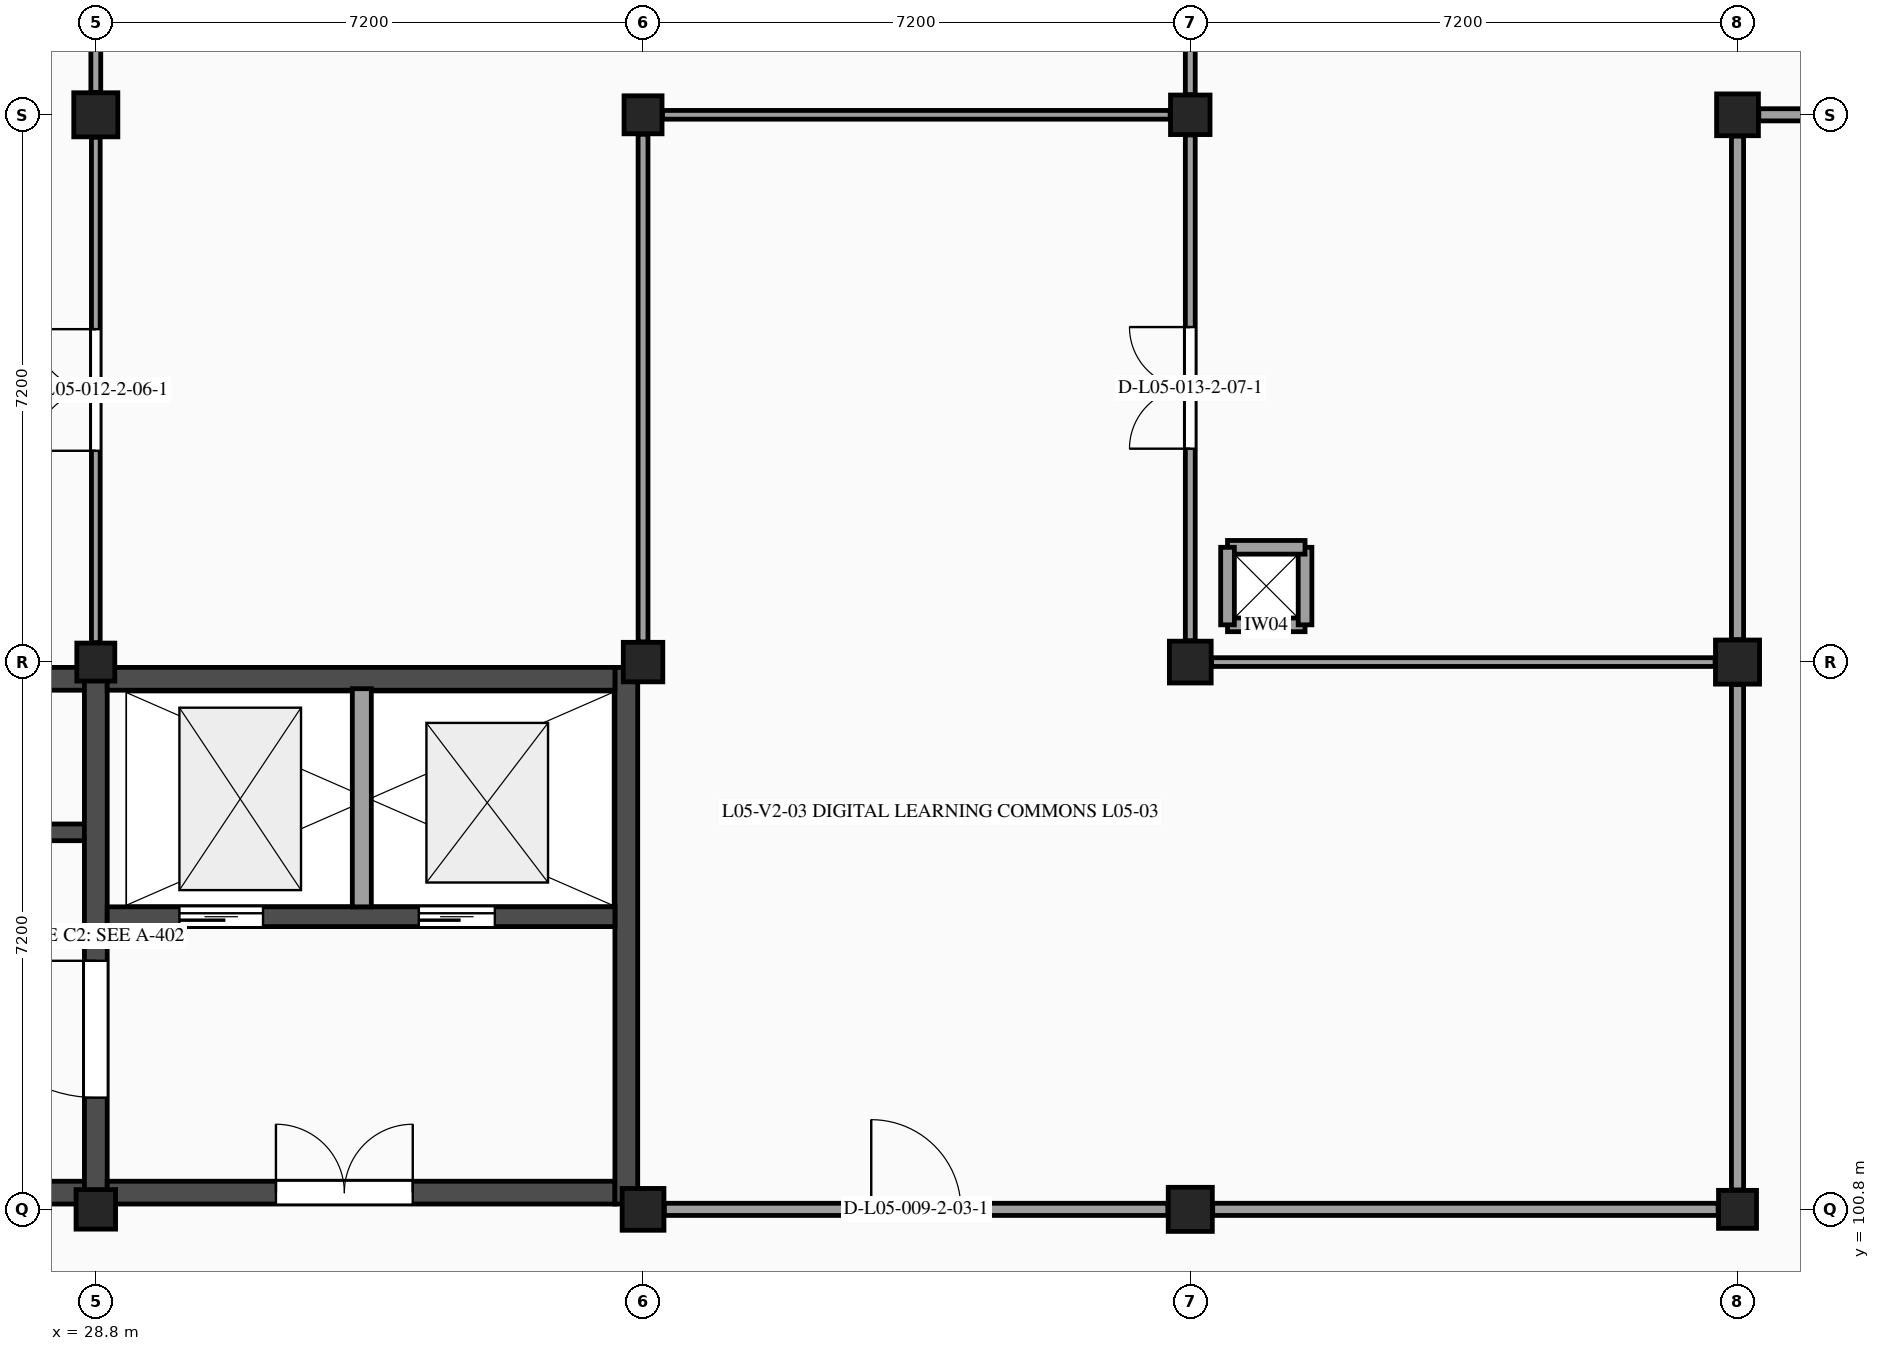
"""IFC4 building model, lengths in metres.
Left out: names, types, materials, properties, quantities, classifications, styles, units other than length and angle.
Written with IfcOpenShell. Run it as: python <this file> out.ifc"""

import sys

from ifc_helpers import new_model, si_unit, direction, frame, frame_2d, origin, origin_2d, place, context, subcontext, project, spatial, rectangle, extrude, element, fill, save


model = new_model("IFC4")
c1 = context("Model", 3, precision=1e-05, world=origin(), true_north=direction((0.0, 1.0)))
c2 = subcontext(c1, "Body", "Model", "MODEL_VIEW")
j1 = project(units=[si_unit("LENGTHUNIT", "METRE"), si_unit("PLANEANGLEUNIT", "RADIAN")], contexts=[c1])
p1 = place(None, origin())
s1 = spatial("IfcSite", under=j1, at=p1, CompositionType="ELEMENT")
p2 = place(p1, origin())
s2 = spatial("IfcBuilding", under=s1, at=p2, CompositionType="ELEMENT")
p3 = place(p2, frame((0.0, 0.0, 22.8)))
s3 = spatial("IfcBuildingStorey", under=s2, at=p3, CompositionType="ELEMENT", Elevation=22.8)
p4 = place(p3, frame((28.8, 100.8, 0.0), z_axis=(0.0, 0.0, 1.0), x_axis=(1.0, 0.0, 0.0)))
e1 = element("IfcColumn", 1, at=p4, inside=s3, PredefinedType="COLUMN", context=c2, shape_type="SweptSolid", body=[
    extrude(rectangle(XDim=0.52, YDim=0.52, at=origin_2d()), origin(), (0.0, 0.0, 1.0), 3.9),
])
p5 = place(p3, frame((28.8, 108.0, 0.0), z_axis=(0.0, 0.0, 1.0), x_axis=(1.0, 0.0, 0.0)))
e2 = element("IfcColumn", 2, at=p5, inside=s3, PredefinedType="COLUMN", context=c2, shape_type="SweptSolid", body=[
    extrude(rectangle(XDim=0.5, YDim=0.5, at=origin_2d()), origin(), (0.0, 0.0, 1.0), 3.9),
])
p6 = place(p3, frame((28.8, 115.2, 0.0), z_axis=(0.0, 0.0, 1.0), x_axis=(1.0, 0.0, 0.0)))
e3 = element("IfcColumn", 3, at=p6, inside=s3, PredefinedType="COLUMN", context=c2, shape_type="SweptSolid", body=[
    extrude(rectangle(XDim=0.58, YDim=0.58, at=origin_2d()), origin(), (0.0, 0.0, 1.0), 3.9),
])
p7 = place(p3, frame((36.0, 100.8, 0.0), z_axis=(0.0, 0.0, 1.0), x_axis=(1.0, 0.0, 0.0)))
e4 = element("IfcColumn", 4, at=p7, inside=s3, PredefinedType="COLUMN", context=c2, shape_type="SweptSolid", body=[
    extrude(rectangle(XDim=0.55, YDim=0.55, at=origin_2d()), origin(), (0.0, 0.0, 1.0), 3.9),
])
p8 = place(p3, frame((36.0, 108.0, 0.0), z_axis=(0.0, 0.0, 1.0), x_axis=(1.0, 0.0, 0.0)))
e5 = element("IfcColumn", 5, at=p8, inside=s3, PredefinedType="COLUMN", context=c2, shape_type="SweptSolid", body=[
    extrude(rectangle(XDim=0.52, YDim=0.52, at=origin_2d()), origin(), (0.0, 0.0, 1.0), 3.9),
])
p9 = place(p3, frame((36.0, 115.2, 0.0), z_axis=(0.0, 0.0, 1.0), x_axis=(1.0, 0.0, 0.0)))
e6 = element("IfcColumn", 6, at=p9, inside=s3, PredefinedType="COLUMN", context=c2, shape_type="SweptSolid", body=[
    extrude(rectangle(XDim=0.5, YDim=0.5, at=origin_2d()), origin(), (0.0, 0.0, 1.0), 3.9),
])
p10 = place(p3, frame((43.2, 100.8, 0.0), z_axis=(0.0, 0.0, 1.0), x_axis=(1.0, 0.0, 0.0)))
e7 = element("IfcColumn", 7, at=p10, inside=s3, PredefinedType="COLUMN", context=c2, shape_type="SweptSolid", body=[
    extrude(rectangle(XDim=0.58, YDim=0.58, at=origin_2d()), origin(), (0.0, 0.0, 1.0), 3.9),
])
p11 = place(p3, frame((43.2, 108.0, 0.0), z_axis=(0.0, 0.0, 1.0), x_axis=(1.0, 0.0, 0.0)))
e8 = element("IfcColumn", 8, at=p11, inside=s3, PredefinedType="COLUMN", context=c2, shape_type="SweptSolid", body=[
    extrude(rectangle(XDim=0.55, YDim=0.55, at=origin_2d()), origin(), (0.0, 0.0, 1.0), 3.9),
])
p12 = place(p3, frame((43.2, 115.2, 0.0), z_axis=(0.0, 0.0, 1.0), x_axis=(1.0, 0.0, 0.0)))
e9 = element("IfcColumn", 9, at=p12, inside=s3, PredefinedType="COLUMN", context=c2, shape_type="SweptSolid", body=[
    extrude(rectangle(XDim=0.52, YDim=0.52, at=origin_2d()), origin(), (0.0, 0.0, 1.0), 3.9),
])
p13 = place(p3, frame((50.4, 100.8, 0.0), z_axis=(0.0, 0.0, 1.0), x_axis=(1.0, 0.0, 0.0)))
e10 = element("IfcColumn", 10, at=p13, inside=s3, PredefinedType="COLUMN", context=c2, shape_type="SweptSolid", body=[
    extrude(rectangle(XDim=0.5, YDim=0.5, at=origin_2d()), origin(), (0.0, 0.0, 1.0), 3.9),
])
p14 = place(p3, frame((50.4, 108.0, 0.0), z_axis=(0.0, 0.0, 1.0), x_axis=(1.0, 0.0, 0.0)))
e11 = element("IfcColumn", 11, at=p14, inside=s3, PredefinedType="COLUMN", context=c2, shape_type="SweptSolid", body=[
    extrude(rectangle(XDim=0.58, YDim=0.58, at=origin_2d()), origin(), (0.0, 0.0, 1.0), 3.9),
])
p15 = place(p3, frame((50.4, 115.2, 0.0), z_axis=(0.0, 0.0, 1.0), x_axis=(1.0, 0.0, 0.0)))
e12 = element("IfcColumn", 12, at=p15, inside=s3, PredefinedType="COLUMN", context=c2, shape_type="SweptSolid", body=[
    extrude(rectangle(XDim=0.55, YDim=0.55, at=origin_2d()), origin(), (0.0, 0.0, 1.0), 3.9),
])
p16 = place(p3, frame((21.97, 101.02, 0.0), z_axis=(0.0, 0.0, 1.0), x_axis=(1.0, 0.0, 0.0)))
e13 = element("IfcWall", 13, at=p16, inside=s3, PredefinedType="SHEAR", context=c2, shape_type="SweptSolid", body=[
    extrude(rectangle(XDim=6.68, YDim=0.3, at=frame_2d((3.34, 0.0))), origin(), (0.0, 0.0, 1.0), 3.67),
])
p17 = place(p3, frame((21.97, 107.78, 0.0), z_axis=(0.0, 0.0, 1.0), x_axis=(1.0, 0.0, 0.0)))
e14 = element("IfcWall", 14, at=p17, inside=s3, PredefinedType="SHEAR", context=c2, shape_type="SweptSolid", body=[
    extrude(rectangle(XDim=6.68, YDim=0.3, at=frame_2d((3.34, 0.0))), origin(), (0.0, 0.0, 1.0), 3.67),
])
p18 = place(p17, frame((1.42, 0.0, 0.0)))
e15 = element("IfcOpeningElement", 15, at=p18, cuts=e14, PredefinedType="OPENING", context=c2, shape_type="SweptSolid", body=[
    extrude(rectangle(XDim=0.85, YDim=2.1, at=frame_2d((0.425, 1.05))), frame((0.0, 0.16, 0.0), z_axis=(0.0, -1.0, 0.0), x_axis=(1.0, 0.0, 0.0)), (0.0, 0.0, 1.0), 0.32),
])
p19 = place(p17, frame((3.4, 0.0, 0.0)))
e16 = element("IfcOpeningElement", 16, at=p19, cuts=e14, PredefinedType="OPENING", context=c2, shape_type="SweptSolid", body=[
    extrude(rectangle(XDim=0.95, YDim=2.15, at=frame_2d((0.475, 1.075))), frame((0.0, 0.16, 0.0), z_axis=(0.0, -1.0, 0.0), x_axis=(1.0, 0.0, 0.0)), (0.0, 0.0, 1.0), 0.32),
])
p20 = place(p3, frame((21.97, 105.76, 0.0), z_axis=(0.0, 0.0, 1.0), x_axis=(1.0, 0.0, 0.0)))
e17 = element("IfcWall", 17, at=p20, inside=s3, PredefinedType="SHEAR", context=c2, shape_type="SweptSolid", body=[
    extrude(rectangle(XDim=6.68, YDim=0.22, at=frame_2d((3.34, 0.0))), origin(), (0.0, 0.0, 1.0), 3.67),
])
p21 = place(p3, frame((28.8, 100.87, 0.0), z_axis=(0.0, 0.0, 1.0), x_axis=(0.0, 1.0, 0.0)))
e18 = element("IfcWall", 18, at=p21, inside=s3, PredefinedType="SHEAR", context=c2, shape_type="SweptSolid", body=[
    extrude(rectangle(XDim=7.06, YDim=0.3, at=frame_2d((3.53, 0.0))), origin(), (0.0, 0.0, 1.0), 3.67),
])
p22 = place(p21, frame((1.4, 0.0, 0.0)))
e19 = element("IfcOpeningElement", 19, at=p22, cuts=e18, PredefinedType="OPENING", context=c2, shape_type="SweptSolid", body=[
    extrude(rectangle(XDim=1.8, YDim=2.2, at=frame_2d((0.9, 1.1))), frame((0.0, 0.16, 0.0), z_axis=(0.0, -1.0, 0.0), x_axis=(1.0, 0.0, 0.0)), (0.0, 0.0, 1.0), 0.32),
])
p23 = place(p3, frame((28.95, 101.02, 0.0), z_axis=(0.0, 0.0, 1.0), x_axis=(1.0, 0.0, 0.0)))
e20 = element("IfcWall", 20, at=p23, inside=s3, PredefinedType="SHEAR", context=c2, shape_type="SweptSolid", body=[
    extrude(rectangle(XDim=6.68, YDim=0.3, at=frame_2d((3.34, 0.0))), origin(), (0.0, 0.0, 1.0), 3.67),
])
p24 = place(p23, frame((2.22, 0.0, 0.0)))
e21 = element("IfcOpeningElement", 21, at=p24, cuts=e20, PredefinedType="OPENING", context=c2, shape_type="SweptSolid", body=[
    extrude(rectangle(XDim=1.8, YDim=2.2, at=frame_2d((0.9, 1.1))), frame((0.0, 0.16, 0.0), z_axis=(0.0, -1.0, 0.0), x_axis=(1.0, 0.0, 0.0)), (0.0, 0.0, 1.0), 0.32),
])
p25 = place(p3, frame((35.78, 100.87, 0.0), z_axis=(0.0, 0.0, 1.0), x_axis=(0.0, 1.0, 0.0)))
e22 = element("IfcWall", 22, at=p25, inside=s3, PredefinedType="SHEAR", context=c2, shape_type="SweptSolid", body=[
    extrude(rectangle(XDim=7.06, YDim=0.3, at=frame_2d((3.53, 0.0))), origin(), (0.0, 0.0, 1.0), 3.67),
])
p26 = place(p3, frame((28.95, 107.78, 0.0), z_axis=(0.0, 0.0, 1.0), x_axis=(1.0, 0.0, 0.0)))
e23 = element("IfcWall", 23, at=p26, inside=s3, PredefinedType="SHEAR", context=c2, shape_type="SweptSolid", body=[
    extrude(rectangle(XDim=6.68, YDim=0.3, at=frame_2d((3.34, 0.0))), origin(), (0.0, 0.0, 1.0), 3.67),
])
p27 = place(p3, frame((28.95, 104.65, 0.0), z_axis=(0.0, 0.0, 1.0), x_axis=(1.0, 0.0, 0.0)))
e24 = element("IfcWall", 24, at=p27, inside=s3, PredefinedType="SHEAR", context=c2, shape_type="SweptSolid", body=[
    extrude(rectangle(XDim=6.68, YDim=0.26, at=frame_2d((3.34, 0.0))), origin(), (0.0, 0.0, 1.0), 3.67),
])
p28 = place(p27, frame((0.95, 0.0, 0.0)))
e25 = element("IfcOpeningElement", 25, at=p28, cuts=e24, PredefinedType="OPENING", context=c2, shape_type="SweptSolid", body=[
    extrude(rectangle(XDim=1.1, YDim=2.2, at=frame_2d((0.55, 1.1))), frame((0.0, 0.14, 0.0), z_axis=(0.0, -1.0, 0.0), x_axis=(1.0, 0.0, 0.0)), (0.0, 0.0, 1.0), 0.28),
])
p29 = place(p27, frame((4.1, 0.0, 0.0)))
e26 = element("IfcOpeningElement", 26, at=p29, cuts=e24, PredefinedType="OPENING", context=c2, shape_type="SweptSolid", body=[
    extrude(rectangle(XDim=1.0, YDim=2.15, at=frame_2d((0.5, 1.075))), frame((0.0, 0.14, 0.0), z_axis=(0.0, -1.0, 0.0), x_axis=(1.0, 0.0, 0.0)), (0.0, 0.0, 1.0), 0.28),
])
p30 = place(p3, frame((32.3, 104.78, 0.0), z_axis=(0.0, 0.0, 1.0), x_axis=(0.0, 1.0, 0.0)))
e27 = element("IfcWall", 27, at=p30, inside=s3, PredefinedType="PARTITIONING", context=c2, shape_type="SweptSolid", body=[
    extrude(rectangle(XDim=2.87, YDim=0.25, at=frame_2d((1.435, 0.0))), origin(), (0.0, 0.0, 1.0), 3.67),
])
for number, where, z_axis, x_axis in (
    (28, (43.69, 108.49, 0.0), (0.0, 0.0, 1.0), (1.0, 0.0, 0.0)),
    (29, (44.71, 108.49, 0.0), (0.0, 0.0, 1.0), (0.0, 1.0, 0.0)),
    (30, (44.71, 109.51, 0.0), (0.0, 0.0, 1.0), (-1.0, 0.0, 0.0)),
    (31, (43.69, 109.51, 0.0), (0.0, 0.0, 1.0), (0.0, -1.0, 0.0)),
):
    element("IfcWall", number, at=place(p3, frame(where, z_axis=z_axis, x_axis=x_axis)), inside=s3, PredefinedType="PARTITIONING", context=c2, shape_type="SweptSolid", body=[
        extrude(rectangle(XDim=1.02, YDim=0.18, at=frame_2d((0.51, 0.0))), origin(), (0.0, 0.0, 1.0), 3.67),
    ])
p31 = place(p3, frame((28.8, 108.255, 0.0), z_axis=(0.0, 0.0, 1.0), x_axis=(0.0, 1.0, 0.0)))
e32 = element("IfcWall", 32, at=p31, inside=s3, PredefinedType="PARTITIONING", context=c2, shape_type="SweptSolid", body=[
    extrude(rectangle(XDim=6.65, YDim=0.115, at=frame_2d((3.325, 0.0))), origin(), (0.0, 0.0, 1.0), 3.27),
])
p32 = place(p31, frame((2.525, 0.0, 0.0)))
e33 = element("IfcOpeningElement", 33, at=p32, cuts=e32, PredefinedType="OPENING", context=c2, shape_type="SweptSolid", body=[
    extrude(rectangle(XDim=1.6, YDim=2.2, at=frame_2d((0.8, 1.1))), frame((0.0, 0.067, 0.0), z_axis=(0.0, -1.0, 0.0), x_axis=(1.0, 0.0, 0.0)), (0.0, 0.0, 1.0), 0.135),
])
p33 = place(p3, frame((28.8, 115.495, 0.0), z_axis=(0.0, 0.0, 1.0), x_axis=(0.0, 1.0, 0.0)))
e34 = element("IfcWall", 34, at=p33, inside=s3, PredefinedType="PARTITIONING", context=c2, shape_type="SweptSolid", body=[
    extrude(rectangle(XDim=6.625, YDim=0.13, at=frame_2d((3.312, 0.0))), origin(), (0.0, 0.0, 1.0), 3.265),
])
p34 = place(p3, frame((36.0, 108.265, 0.0), z_axis=(0.0, 0.0, 1.0), x_axis=(0.0, 1.0, 0.0)))
e35 = element("IfcWall", 35, at=p34, inside=s3, PredefinedType="PARTITIONING", context=c2, shape_type="SweptSolid", body=[
    extrude(rectangle(XDim=6.68, YDim=0.13, at=frame_2d((3.34, 0.0))), origin(), (0.0, 0.0, 1.0), 3.27),
])
p35 = place(p3, frame((36.28, 100.8, 0.0), z_axis=(0.0, 0.0, 1.0), x_axis=(1.0, 0.0, 0.0)))
e36 = element("IfcWall", 36, at=p35, inside=s3, PredefinedType="PARTITIONING", context=c2, shape_type="SweptSolid", body=[
    extrude(rectangle(XDim=6.625, YDim=0.16, at=frame_2d((3.312, 0.0))), origin(), (0.0, 0.0, 1.0), 3.12),
])
p36 = place(p35, frame((2.722, 0.0, 0.0)))
e37 = element("IfcOpeningElement", 37, at=p36, cuts=e36, PredefinedType="OPENING", context=c2, shape_type="SweptSolid", body=[
    extrude(rectangle(XDim=1.18, YDim=2.18, at=frame_2d((0.59, 1.09))), frame((0.0, 0.09, 0.0), z_axis=(0.0, -1.0, 0.0), x_axis=(1.0, 0.0, 0.0)), (0.0, 0.0, 1.0), 0.18),
])
p37 = place(p3, frame((43.2, 108.28, 0.0), z_axis=(0.0, 0.0, 1.0), x_axis=(0.0, 1.0, 0.0)))
e38 = element("IfcWall", 38, at=p37, inside=s3, PredefinedType="PARTITIONING", context=c2, shape_type="SweptSolid", body=[
    extrude(rectangle(XDim=6.655, YDim=0.13, at=frame_2d((3.328, 0.0))), origin(), (0.0, 0.0, 1.0), 3.27),
])
p38 = place(p37, frame((2.528, 0.0, 0.0)))
e39 = element("IfcOpeningElement", 39, at=p38, cuts=e38, PredefinedType="OPENING", context=c2, shape_type="SweptSolid", body=[
    extrude(rectangle(XDim=1.6, YDim=2.2, at=frame_2d((0.8, 1.1))), frame((0.0, 0.075, 0.0), z_axis=(0.0, -1.0, 0.0), x_axis=(1.0, 0.0, 0.0)), (0.0, 0.0, 1.0), 0.15),
])
p39 = place(p3, frame((36.255, 115.2, 0.0), z_axis=(0.0, 0.0, 1.0), x_axis=(1.0, 0.0, 0.0)))
e40 = element("IfcWall", 40, at=p39, inside=s3, PredefinedType="PARTITIONING", context=c2, shape_type="SweptSolid", body=[
    extrude(rectangle(XDim=6.68, YDim=0.115, at=frame_2d((3.34, 0.0))), origin(), (0.0, 0.0, 1.0), 3.12),
])
p40 = place(p3, frame((43.2, 115.465, 0.0), z_axis=(0.0, 0.0, 1.0), x_axis=(0.0, 1.0, 0.0)))
e41 = element("IfcWall", 41, at=p40, inside=s3, PredefinedType="PARTITIONING", context=c2, shape_type="SweptSolid", body=[
    extrude(rectangle(XDim=6.68, YDim=0.13, at=frame_2d((3.34, 0.0))), origin(), (0.0, 0.0, 1.0), 3.265),
])
p41 = place(p3, frame((43.495, 100.8, 0.0), z_axis=(0.0, 0.0, 1.0), x_axis=(1.0, 0.0, 0.0)))
e42 = element("IfcWall", 42, at=p41, inside=s3, PredefinedType="PARTITIONING", context=c2, shape_type="SweptSolid", body=[
    extrude(rectangle(XDim=6.65, YDim=0.16, at=frame_2d((3.325, 0.0))), origin(), (0.0, 0.0, 1.0), 3.15),
])
p42 = place(p3, frame((50.4, 101.055, 0.0), z_axis=(0.0, 0.0, 1.0), x_axis=(0.0, 1.0, 0.0)))
e43 = element("IfcWall", 43, at=p42, inside=s3, PredefinedType="PARTITIONING", context=c2, shape_type="SweptSolid", body=[
    extrude(rectangle(XDim=6.65, YDim=0.16, at=frame_2d((3.325, 0.0))), origin(), (0.0, 0.0, 1.0), 3.205),
])
p43 = place(p3, frame((43.48, 108.0, 0.0), z_axis=(0.0, 0.0, 1.0), x_axis=(1.0, 0.0, 0.0)))
e44 = element("IfcWall", 44, at=p43, inside=s3, PredefinedType="PARTITIONING", context=c2, shape_type="SweptSolid", body=[
    extrude(rectangle(XDim=6.625, YDim=0.115, at=frame_2d((3.312, 0.0))), origin(), (0.0, 0.0, 1.0), 3.15),
])
p44 = place(p3, frame((50.4, 108.295, 0.0), z_axis=(0.0, 0.0, 1.0), x_axis=(0.0, 1.0, 0.0)))
e45 = element("IfcWall", 45, at=p44, inside=s3, PredefinedType="PARTITIONING", context=c2, shape_type="SweptSolid", body=[
    extrude(rectangle(XDim=6.625, YDim=0.16, at=frame_2d((3.312, 0.0))), origin(), (0.0, 0.0, 1.0), 3.27),
])
p45 = place(p3, frame((50.68, 115.2, 0.0), z_axis=(0.0, 0.0, 1.0), x_axis=(1.0, 0.0, 0.0)))
e46 = element("IfcWall", 46, at=p45, inside=s3, PredefinedType="PARTITIONING", context=c2, shape_type="SweptSolid", body=[
    extrude(rectangle(XDim=6.625, YDim=0.16, at=frame_2d((3.312, 0.0))), origin(), (0.0, 0.0, 1.0), 3.16),
])
p46 = place(p22, origin())
e47 = element("IfcDoor", 47, at=p46, inside=s3, OperationType="SINGLE_SWING_RIGHT", PredefinedType="DOOR", context=c2, shape_type="SweptSolid", body=[
    extrude(rectangle(XDim=1.8, YDim=2.2, at=frame_2d((0.9, 1.1))), frame((0.0, 0.025, 0.0), z_axis=(0.0, -1.0, 0.0), x_axis=(1.0, 0.0, 0.0)), (0.0, 0.0, 1.0), 0.05),
])
fill(e19, e47)
p47 = place(p28, origin())
e48 = element("IfcDoor", 48, at=p47, inside=s3, OperationType="SLIDING_TO_LEFT", PredefinedType="DOOR", context=c2, shape_type="SweptSolid", body=[
    extrude(rectangle(XDim=1.1, YDim=2.2, at=frame_2d((0.55, 1.1))), frame((0.0, 0.025, 0.0), z_axis=(0.0, -1.0, 0.0), x_axis=(1.0, 0.0, 0.0)), (0.0, 0.0, 1.0), 0.05),
])
fill(e25, e48)
p48 = place(p29, origin())
e49 = element("IfcDoor", 49, at=p48, inside=s3, OperationType="SLIDING_TO_RIGHT", PredefinedType="DOOR", context=c2, shape_type="SweptSolid", body=[
    extrude(rectangle(XDim=1.0, YDim=2.15, at=frame_2d((0.5, 1.075))), frame((0.0, 0.025, 0.0), z_axis=(0.0, -1.0, 0.0), x_axis=(1.0, 0.0, 0.0)), (0.0, 0.0, 1.0), 0.05),
])
fill(e26, e49)
p49 = place(p24, origin())
e50 = element("IfcDoor", 50, at=p49, inside=s3, OperationType="DOUBLE_DOOR_SINGLE_SWING", PredefinedType="DOOR", context=c2, shape_type="SweptSolid", body=[
    extrude(rectangle(XDim=1.8, YDim=2.2, at=frame_2d((0.9, 1.1))), frame((0.0, 0.025, 0.0), z_axis=(0.0, -1.0, 0.0), x_axis=(1.0, 0.0, 0.0)), (0.0, 0.0, 1.0), 0.05),
])
fill(e21, e50)
p50 = place(p36, origin())
e51 = element("IfcDoor", 51, at=p50, inside=s3, OperationType="SINGLE_SWING_LEFT", PredefinedType="DOOR", context=c2, shape_type="SweptSolid", body=[
    extrude(rectangle(XDim=1.18, YDim=2.18, at=frame_2d((0.59, 1.09))), frame((0.0, 0.025, 0.0), z_axis=(0.0, -1.0, 0.0), x_axis=(1.0, 0.0, 0.0)), (0.0, 0.0, 1.0), 0.05),
])
fill(e37, e51)
p51 = place(p32, origin())
e52 = element("IfcDoor", 52, at=p51, inside=s3, OperationType="DOUBLE_DOOR_SINGLE_SWING", PredefinedType="DOOR", context=c2, shape_type="SweptSolid", body=[
    extrude(rectangle(XDim=1.6, YDim=2.2, at=frame_2d((0.8, 1.1))), frame((0.0, 0.025, 0.0), z_axis=(0.0, -1.0, 0.0), x_axis=(1.0, 0.0, 0.0)), (0.0, 0.0, 1.0), 0.05),
])
fill(e33, e52)
p52 = place(p38, origin())
e53 = element("IfcDoor", 53, at=p52, inside=s3, OperationType="DOUBLE_DOOR_SINGLE_SWING", PredefinedType="DOOR", context=c2, shape_type="SweptSolid", body=[
    extrude(rectangle(XDim=1.6, YDim=2.2, at=frame_2d((0.8, 1.1))), frame((0.0, 0.025, 0.0), z_axis=(0.0, -1.0, 0.0), x_axis=(1.0, 0.0, 0.0)), (0.0, 0.0, 1.0), 0.05),
])
fill(e39, e53)
save(model, sys.argv[1])
